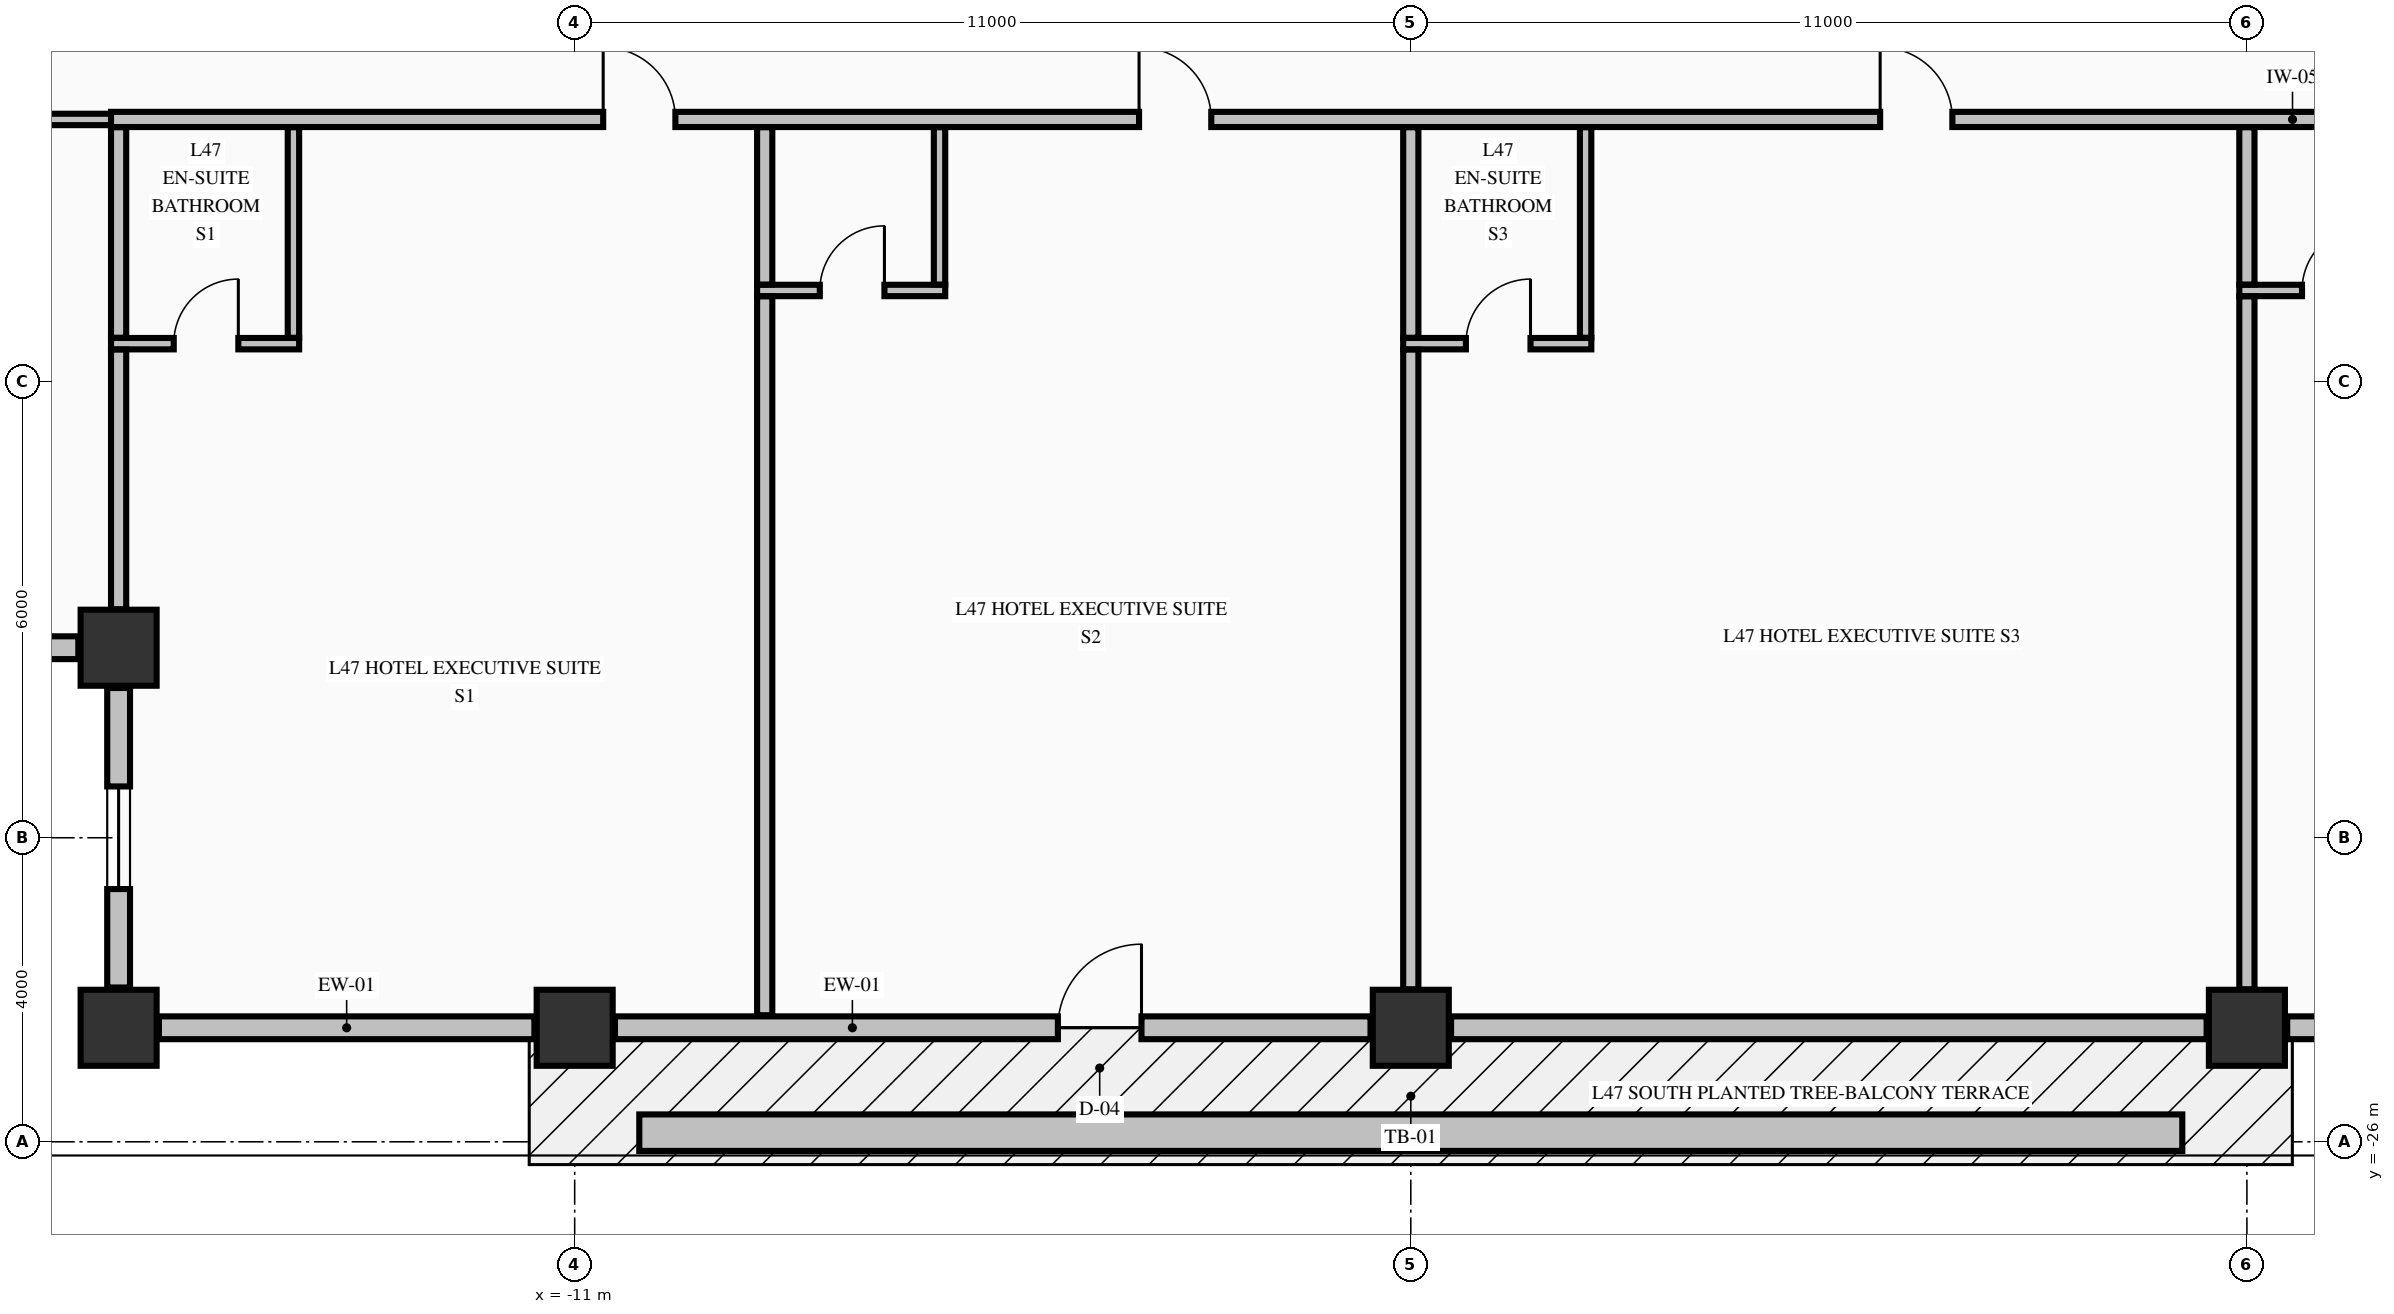
"""IFC4 building model, lengths in metres.
Left out: names, types, materials, properties, quantities, classifications, styles, units other than length and angle.
Written with IfcOpenShell. Run it as: python <this file> out.ifc"""

import sys

from ifc_helpers import new_model, si_unit, direction, frame, frame_2d, origin, origin_2d, place, context, subcontext, project, spatial, rectangle, extrude, element, fill, save


model = new_model("IFC4")
c1 = context("Model", 3, precision=1e-05, world=origin(), true_north=direction((0.0, 1.0)))
c2 = subcontext(c1, "Body", "Model", "MODEL_VIEW")
j1 = project(units=[si_unit("LENGTHUNIT", "METRE"), si_unit("PLANEANGLEUNIT", "RADIAN")], contexts=[c1])
p1 = place(None, origin())
s1 = spatial("IfcSite", under=j1, at=p1, CompositionType="ELEMENT")
p2 = place(p1, origin())
s2 = spatial("IfcBuilding", under=s1, at=p2, CompositionType="ELEMENT")
p3 = place(p2, frame((0.0, 0.0, 183.06)))
s3 = spatial("IfcBuildingStorey", under=s2, at=p3, CompositionType="ELEMENT", Elevation=183.06)
for number, where, z_axis, x_axis in (
    (1, (-17.0, -24.5, -0.25), (0.0, 0.0, 1.0), (1.0, 0.0, 0.0)),
    (2, (-11.0, -24.5, -0.25), (0.0, 0.0, 1.0), (1.0, 0.0, 0.0)),
    (3, (0.0, -24.5, -0.25), (0.0, 0.0, 1.0), (1.0, 0.0, 0.0)),
    (4, (11.0, -24.5, -0.25), (0.0, 0.0, 1.0), (1.0, 0.0, 0.0)),
    (5, (-17.0, -19.5, -0.25), (0.0, 0.0, 1.0), (1.0, 0.0, 0.0)),
):
    element("IfcColumn", number, at=place(p3, frame(where, z_axis=z_axis, x_axis=x_axis)), inside=s3, PredefinedType="COLUMN", context=c2, shape_type="SweptSolid", body=[
        extrude(rectangle(XDim=1.0, YDim=1.0, at=origin_2d()), origin(), (0.0, 0.0, 1.0), 3.225),
    ])
p4 = place(p3, frame((-21.47, -19.5, 0.0), z_axis=(0.0, 0.0, 1.0), x_axis=(1.0, 0.0, 0.0)))
e6 = element("IfcWall", 6, at=p4, inside=s3, PredefinedType="STANDARD", context=c2, shape_type="SweptSolid", body=[
    extrude(rectangle(XDim=3.94, YDim=0.3, at=frame_2d((1.97, 0.0))), origin(), (0.0, 0.0, 1.0), 2.367),
])
p5 = place(p4, frame((1.295, 0.0, 0.68)))
e7 = element("IfcOpeningElement", 7, at=p5, cuts=e6, PredefinedType="OPENING", context=c2, shape_type="SweptSolid", body=[
    extrude(rectangle(XDim=1.35, YDim=1.42, at=frame_2d((0.675, 0.71))), frame((0.0, 0.16, 0.0), z_axis=(0.0, -1.0, 0.0), x_axis=(1.0, 0.0, 0.0)), (0.0, 0.0, 1.0), 0.32),
])
p6 = place(p3, frame((-17.0, -20.03, 0.0), z_axis=(0.0, 0.0, 1.0), x_axis=(0.0, -1.0, 0.0)))
e8 = element("IfcWall", 8, at=p6, inside=s3, PredefinedType="STANDARD", context=c2, shape_type="SweptSolid", body=[
    extrude(rectangle(XDim=3.94, YDim=0.3, at=frame_2d((1.97, 0.0))), origin(), (0.0, 0.0, 1.0), 2.367),
])
p7 = place(p6, frame((1.295, 0.0, 0.68)))
e9 = element("IfcOpeningElement", 9, at=p7, cuts=e8, PredefinedType="OPENING", context=c2, shape_type="SweptSolid", body=[
    extrude(rectangle(XDim=1.35, YDim=1.42, at=frame_2d((0.675, 0.71))), frame((0.0, 0.16, 0.0), z_axis=(0.0, -1.0, 0.0), x_axis=(1.0, 0.0, 0.0)), (0.0, 0.0, 1.0), 0.32),
])
p8 = place(p3, frame((-16.47, -24.5, 0.0), z_axis=(0.0, 0.0, 1.0), x_axis=(1.0, 0.0, 0.0)))
e10 = element("IfcWall", 10, at=p8, inside=s3, PredefinedType="STANDARD", context=c2, shape_type="SweptSolid", body=[
    extrude(rectangle(XDim=4.94, YDim=0.3, at=frame_2d((2.47, 0.0))), origin(), (0.0, 0.0, 1.0), 2.367),
])
p9 = place(p3, frame((-10.47, -24.5, 0.0), z_axis=(0.0, 0.0, 1.0), x_axis=(1.0, 0.0, 0.0)))
e11 = element("IfcWall", 11, at=p9, inside=s3, PredefinedType="STANDARD", context=c2, shape_type="SweptSolid", body=[
    extrude(rectangle(XDim=9.94, YDim=0.3, at=frame_2d((4.97, 0.0))), origin(), (0.0, 0.0, 1.0), 2.367),
])
p10 = place(p9, frame((5.827, 0.0, 0.0)))
e12 = element("IfcOpeningElement", 12, at=p10, cuts=e11, PredefinedType="OPENING", context=c2, shape_type="SweptSolid", body=[
    extrude(rectangle(XDim=1.1, YDim=2.15, at=frame_2d((0.55, 1.075))), frame((0.0, 0.16, 0.0), z_axis=(0.0, -1.0, 0.0), x_axis=(1.0, 0.0, 0.0)), (0.0, 0.0, 1.0), 0.32),
])
for number, where, z_axis, x_axis in (
    (13, (0.53, -24.5, 0.0), (0.0, 0.0, 1.0), (1.0, 0.0, 0.0)),
    (14, (11.53, -24.5, 0.0), (0.0, 0.0, 1.0), (1.0, 0.0, 0.0)),
):
    element("IfcWall", number, at=place(p3, frame(where, z_axis=z_axis, x_axis=x_axis)), inside=s3, PredefinedType="STANDARD", context=c2, shape_type="SweptSolid", body=[
        extrude(rectangle(XDim=9.94, YDim=0.3, at=frame_2d((4.97, 0.0))), origin(), (0.0, 0.0, 1.0), 2.367),
    ])
p11 = place(p3, frame((-17.1, -15.5, 0.0), z_axis=(0.0, 0.0, 1.0), x_axis=(1.0, 0.0, 0.0)))
e15 = element("IfcWall", 15, at=p11, inside=s3, PredefinedType="PARTITIONING", context=c2, shape_type="SweptSolid", body=[
    extrude(rectangle(XDim=2.475, YDim=0.15, at=frame_2d((1.238, 0.0))), origin(), (0.0, 0.0, 1.0), 2.975),
])
p12 = place(p11, frame((0.825, 0.0, 0.0)))
e16 = element("IfcOpeningElement", 16, at=p12, cuts=e15, PredefinedType="OPENING", context=c2, shape_type="SweptSolid", body=[
    extrude(rectangle(XDim=0.85, YDim=2.1, at=frame_2d((0.425, 1.05))), frame((0.0, 0.085, 0.0), z_axis=(0.0, -1.0, 0.0), x_axis=(1.0, 0.0, 0.0)), (0.0, 0.0, 1.0), 0.17),
])
p13 = place(p3, frame((-0.1, -15.5, 0.0), z_axis=(0.0, 0.0, 1.0), x_axis=(1.0, 0.0, 0.0)))
e17 = element("IfcWall", 17, at=p13, inside=s3, PredefinedType="PARTITIONING", context=c2, shape_type="SweptSolid", body=[
    extrude(rectangle(XDim=2.475, YDim=0.15, at=frame_2d((1.238, 0.0))), origin(), (0.0, 0.0, 1.0), 2.975),
])
p14 = place(p13, frame((0.825, 0.0, 0.0)))
e18 = element("IfcOpeningElement", 18, at=p14, cuts=e17, PredefinedType="OPENING", context=c2, shape_type="SweptSolid", body=[
    extrude(rectangle(XDim=0.85, YDim=2.1, at=frame_2d((0.425, 1.05))), frame((0.0, 0.085, 0.0), z_axis=(0.0, -1.0, 0.0), x_axis=(1.0, 0.0, 0.0)), (0.0, 0.0, 1.0), 0.17),
])
p15 = place(p3, frame((-8.6, -14.8, 0.0), z_axis=(0.0, 0.0, 1.0), x_axis=(1.0, 0.0, 0.0)))
e19 = element("IfcWall", 19, at=p15, inside=s3, PredefinedType="PARTITIONING", context=c2, shape_type="SweptSolid", body=[
    extrude(rectangle(XDim=2.475, YDim=0.15, at=frame_2d((1.238, 0.0))), origin(), (0.0, 0.0, 1.0), 2.975),
])
p16 = place(p15, frame((0.825, 0.0, 0.0)))
e20 = element("IfcOpeningElement", 20, at=p16, cuts=e19, PredefinedType="OPENING", context=c2, shape_type="SweptSolid", body=[
    extrude(rectangle(XDim=0.85, YDim=2.1, at=frame_2d((0.425, 1.05))), frame((0.0, 0.085, 0.0), z_axis=(0.0, -1.0, 0.0), x_axis=(1.0, 0.0, 0.0)), (0.0, 0.0, 1.0), 0.17),
])
p17 = place(p3, frame((10.9, -14.8, 0.0), z_axis=(0.0, 0.0, 1.0), x_axis=(1.0, 0.0, 0.0)))
e21 = element("IfcWall", 21, at=p17, inside=s3, PredefinedType="PARTITIONING", context=c2, shape_type="SweptSolid", body=[
    extrude(rectangle(XDim=2.475, YDim=0.15, at=frame_2d((1.238, 0.0))), origin(), (0.0, 0.0, 1.0), 2.975),
])
p18 = place(p17, frame((0.825, 0.0, 0.0)))
e22 = element("IfcOpeningElement", 22, at=p18, cuts=e21, PredefinedType="OPENING", context=c2, shape_type="SweptSolid", body=[
    extrude(rectangle(XDim=0.85, YDim=2.1, at=frame_2d((0.425, 1.05))), frame((0.0, 0.085, 0.0), z_axis=(0.0, -1.0, 0.0), x_axis=(1.0, 0.0, 0.0)), (0.0, 0.0, 1.0), 0.17),
])
p19 = place(p3, frame((-20.075, -12.55, 0.0), z_axis=(0.0, 0.0, 1.0), x_axis=(1.0, 0.0, 0.0)))
e23 = element("IfcWall", 23, at=p19, inside=s3, PredefinedType="PARTITIONING", context=c2, shape_type="SweptSolid", body=[
    extrude(rectangle(XDim=3.175, YDim=0.15, at=frame_2d((1.587, 0.0))), origin(), (0.0, 0.0, 1.0), 2.975),
])
p20 = place(p3, frame((-17.1, -12.55, 0.0), z_axis=(0.0, 0.0, 1.0), x_axis=(1.0, 0.0, 0.0)))
e24 = element("IfcWall", 24, at=p20, inside=s3, PredefinedType="PARTITIONING", context=c2, shape_type="SweptSolid", body=[
    extrude(rectangle(XDim=39.2, YDim=0.2, at=frame_2d((19.6, 0.0))), origin(), (0.0, 0.0, 1.0), 2.975),
])
p21 = place(p20, frame((6.475, 0.0, 0.0)))
e25 = element("IfcOpeningElement", 25, at=p21, cuts=e24, PredefinedType="OPENING", context=c2, shape_type="SweptSolid", body=[
    extrude(rectangle(XDim=0.95, YDim=2.15, at=frame_2d((0.475, 1.075))), frame((0.0, 0.11, 0.0), z_axis=(0.0, -1.0, 0.0), x_axis=(1.0, 0.0, 0.0)), (0.0, 0.0, 1.0), 0.22),
])
p22 = place(p20, frame((13.525, 0.0, 0.0)))
e26 = element("IfcOpeningElement", 26, at=p22, cuts=e24, PredefinedType="OPENING", context=c2, shape_type="SweptSolid", body=[
    extrude(rectangle(XDim=0.95, YDim=2.15, at=frame_2d((0.475, 1.075))), frame((0.0, 0.11, 0.0), z_axis=(0.0, -1.0, 0.0), x_axis=(1.0, 0.0, 0.0)), (0.0, 0.0, 1.0), 0.22),
])
p23 = place(p20, frame((23.275, 0.0, 0.0)))
e27 = element("IfcOpeningElement", 27, at=p23, cuts=e24, PredefinedType="OPENING", context=c2, shape_type="SweptSolid", body=[
    extrude(rectangle(XDim=0.95, YDim=2.15, at=frame_2d((0.475, 1.075))), frame((0.0, 0.11, 0.0), z_axis=(0.0, -1.0, 0.0), x_axis=(1.0, 0.0, 0.0)), (0.0, 0.0, 1.0), 0.22),
])
p24 = place(p20, frame((33.175, 0.0, 0.0)))
e28 = element("IfcOpeningElement", 28, at=p24, cuts=e24, PredefinedType="OPENING", context=c2, shape_type="SweptSolid", body=[
    extrude(rectangle(XDim=0.95, YDim=2.15, at=frame_2d((0.475, 1.075))), frame((0.0, 0.11, 0.0), z_axis=(0.0, -1.0, 0.0), x_axis=(1.0, 0.0, 0.0)), (0.0, 0.0, 1.0), 0.22),
])
p25 = place(p3, frame((-17.0, -18.994, 0.0), z_axis=(0.0, 0.0, 1.0), x_axis=(0.0, 1.0, 0.0)))
e29 = element("IfcWall", 29, at=p25, inside=s3, PredefinedType="PARTITIONING", context=c2, shape_type="SweptSolid", body=[
    extrude(rectangle(XDim=3.416, YDim=0.2, at=frame_2d((1.708, 0.0))), origin(), (0.0, 0.0, 1.0), 2.975),
])
p26 = place(p3, frame((-17.0, -15.422, 0.0), z_axis=(0.0, 0.0, 1.0), x_axis=(0.0, 1.0, 0.0)))
e30 = element("IfcWall", 30, at=p26, inside=s3, PredefinedType="PARTITIONING", context=c2, shape_type="SweptSolid", body=[
    extrude(rectangle(XDim=2.769, YDim=0.2, at=frame_2d((1.385, 0.0))), origin(), (0.0, 0.0, 1.0), 2.975),
])
p27 = place(p3, frame((-14.7, -15.422, 0.0), z_axis=(0.0, 0.0, 1.0), x_axis=(0.0, 1.0, 0.0)))
e31 = element("IfcWall", 31, at=p27, inside=s3, PredefinedType="PARTITIONING", context=c2, shape_type="SweptSolid", body=[
    extrude(rectangle(XDim=2.769, YDim=0.15, at=frame_2d((1.385, 0.0))), origin(), (0.0, 0.0, 1.0), 2.975),
])
p28 = place(p3, frame((-8.5, -24.335, 0.0), z_axis=(0.0, 0.0, 1.0), x_axis=(0.0, 1.0, 0.0)))
e32 = element("IfcWall", 32, at=p28, inside=s3, PredefinedType="PARTITIONING", context=c2, shape_type="SweptSolid", body=[
    extrude(rectangle(XDim=9.457, YDim=0.2, at=frame_2d((4.729, 0.0))), origin(), (0.0, 0.0, 1.0), 2.975),
])
p29 = place(p3, frame((-8.5, -14.722, 0.0), z_axis=(0.0, 0.0, 1.0), x_axis=(0.0, 1.0, 0.0)))
e33 = element("IfcWall", 33, at=p29, inside=s3, PredefinedType="PARTITIONING", context=c2, shape_type="SweptSolid", body=[
    extrude(rectangle(XDim=2.069, YDim=0.2, at=frame_2d((1.034, 0.0))), origin(), (0.0, 0.0, 1.0), 2.975),
])
p30 = place(p3, frame((-6.2, -14.722, 0.0), z_axis=(0.0, 0.0, 1.0), x_axis=(0.0, 1.0, 0.0)))
e34 = element("IfcWall", 34, at=p30, inside=s3, PredefinedType="PARTITIONING", context=c2, shape_type="SweptSolid", body=[
    extrude(rectangle(XDim=2.069, YDim=0.15, at=frame_2d((1.034, 0.0))), origin(), (0.0, 0.0, 1.0), 2.975),
])
p31 = place(p3, frame((0.0, -23.994, 0.0), z_axis=(0.0, 0.0, 1.0), x_axis=(0.0, 1.0, 0.0)))
e35 = element("IfcWall", 35, at=p31, inside=s3, PredefinedType="PARTITIONING", context=c2, shape_type="SweptSolid", body=[
    extrude(rectangle(XDim=8.416, YDim=0.2, at=frame_2d((4.208, 0.0))), origin(), (0.0, 0.0, 1.0), 2.167),
])
p32 = place(p3, frame((0.0, -15.422, 0.0), z_axis=(0.0, 0.0, 1.0), x_axis=(0.0, 1.0, 0.0)))
e36 = element("IfcWall", 36, at=p32, inside=s3, PredefinedType="PARTITIONING", context=c2, shape_type="SweptSolid", body=[
    extrude(rectangle(XDim=2.769, YDim=0.2, at=frame_2d((1.385, 0.0))), origin(), (0.0, 0.0, 1.0), 2.167),
])
p33 = place(p3, frame((2.3, -15.422, 0.0), z_axis=(0.0, 0.0, 1.0), x_axis=(0.0, 1.0, 0.0)))
e37 = element("IfcWall", 37, at=p33, inside=s3, PredefinedType="PARTITIONING", context=c2, shape_type="SweptSolid", body=[
    extrude(rectangle(XDim=2.769, YDim=0.15, at=frame_2d((1.385, 0.0))), origin(), (0.0, 0.0, 1.0), 2.975),
])
p34 = place(p3, frame((11.0, -23.994, 0.0), z_axis=(0.0, 0.0, 1.0), x_axis=(0.0, 1.0, 0.0)))
e38 = element("IfcWall", 38, at=p34, inside=s3, PredefinedType="PARTITIONING", context=c2, shape_type="SweptSolid", body=[
    extrude(rectangle(XDim=9.116, YDim=0.2, at=frame_2d((4.558, 0.0))), origin(), (0.0, 0.0, 1.0), 2.167),
])
p35 = place(p3, frame((11.0, -14.722, 0.0), z_axis=(0.0, 0.0, 1.0), x_axis=(0.0, 1.0, 0.0)))
e39 = element("IfcWall", 39, at=p35, inside=s3, PredefinedType="PARTITIONING", context=c2, shape_type="SweptSolid", body=[
    extrude(rectangle(XDim=2.069, YDim=0.2, at=frame_2d((1.034, 0.0))), origin(), (0.0, 0.0, 1.0), 2.167),
])
p36 = place(p3, frame((-10.15, -25.88, -0.04), z_axis=(0.0, 0.0, 1.0), x_axis=(1.0, 0.0, 0.0)))
e40 = element("IfcWall", 40, at=p36, inside=s3, PredefinedType="PARAPET", context=c2, shape_type="SweptSolid", body=[
    extrude(rectangle(XDim=20.3, YDim=0.48, at=frame_2d((10.15, 0.0))), origin(), (0.0, 0.0, 1.0), 0.52),
])
p37 = place(p7, origin())
e41 = element("IfcWindow", 41, at=p37, inside=s3, PartitioningType="SINGLE_PANEL", PredefinedType="WINDOW", context=c2, shape_type="SweptSolid", body=[
    extrude(rectangle(XDim=1.35, YDim=1.42, at=frame_2d((0.675, 0.71))), frame((0.0, 0.03, 0.0), z_axis=(0.0, -1.0, 0.0), x_axis=(1.0, 0.0, 0.0)), (0.0, 0.0, 1.0), 0.06),
])
fill(e9, e41)
p38 = place(p10, origin())
e42 = element("IfcDoor", 42, at=p38, inside=s3, OperationType="SINGLE_SWING_RIGHT", PredefinedType="DOOR", context=c2, shape_type="SweptSolid", body=[
    extrude(rectangle(XDim=1.1, YDim=2.15, at=frame_2d((0.55, 1.075))), frame((0.0, 0.025, 0.0), z_axis=(0.0, -1.0, 0.0), x_axis=(1.0, 0.0, 0.0)), (0.0, 0.0, 1.0), 0.05),
])
fill(e12, e42)
p39 = place(p21, origin())
e43 = element("IfcDoor", 43, at=p39, inside=s3, OperationType="SINGLE_SWING_LEFT", PredefinedType="DOOR", context=c2, shape_type="SweptSolid", body=[
    extrude(rectangle(XDim=0.95, YDim=2.15, at=frame_2d((0.475, 1.075))), frame((0.0, 0.025, 0.0), z_axis=(0.0, -1.0, 0.0), x_axis=(1.0, 0.0, 0.0)), (0.0, 0.0, 1.0), 0.05),
])
fill(e25, e43)
p40 = place(p12, origin())
e44 = element("IfcDoor", 44, at=p40, inside=s3, OperationType="SINGLE_SWING_RIGHT", PredefinedType="DOOR", context=c2, shape_type="SweptSolid", body=[
    extrude(rectangle(XDim=0.85, YDim=2.1, at=frame_2d((0.425, 1.05))), frame((0.0, 0.025, 0.0), z_axis=(0.0, -1.0, 0.0), x_axis=(1.0, 0.0, 0.0)), (0.0, 0.0, 1.0), 0.05),
])
fill(e16, e44)
p41 = place(p22, origin())
e45 = element("IfcDoor", 45, at=p41, inside=s3, OperationType="SINGLE_SWING_LEFT", PredefinedType="DOOR", context=c2, shape_type="SweptSolid", body=[
    extrude(rectangle(XDim=0.95, YDim=2.15, at=frame_2d((0.475, 1.075))), frame((0.0, 0.025, 0.0), z_axis=(0.0, -1.0, 0.0), x_axis=(1.0, 0.0, 0.0)), (0.0, 0.0, 1.0), 0.05),
])
fill(e26, e45)
p42 = place(p16, origin())
e46 = element("IfcDoor", 46, at=p42, inside=s3, OperationType="SINGLE_SWING_RIGHT", PredefinedType="DOOR", context=c2, shape_type="SweptSolid", body=[
    extrude(rectangle(XDim=0.85, YDim=2.1, at=frame_2d((0.425, 1.05))), frame((0.0, 0.025, 0.0), z_axis=(0.0, -1.0, 0.0), x_axis=(1.0, 0.0, 0.0)), (0.0, 0.0, 1.0), 0.05),
])
fill(e20, e46)
p43 = place(p23, origin())
e47 = element("IfcDoor", 47, at=p43, inside=s3, OperationType="SINGLE_SWING_LEFT", PredefinedType="DOOR", context=c2, shape_type="SweptSolid", body=[
    extrude(rectangle(XDim=0.95, YDim=2.15, at=frame_2d((0.475, 1.075))), frame((0.0, 0.025, 0.0), z_axis=(0.0, -1.0, 0.0), x_axis=(1.0, 0.0, 0.0)), (0.0, 0.0, 1.0), 0.05),
])
fill(e27, e47)
p44 = place(p14, origin())
e48 = element("IfcDoor", 48, at=p44, inside=s3, OperationType="SINGLE_SWING_RIGHT", PredefinedType="DOOR", context=c2, shape_type="SweptSolid", body=[
    extrude(rectangle(XDim=0.85, YDim=2.1, at=frame_2d((0.425, 1.05))), frame((0.0, 0.025, 0.0), z_axis=(0.0, -1.0, 0.0), x_axis=(1.0, 0.0, 0.0)), (0.0, 0.0, 1.0), 0.05),
])
fill(e18, e48)
p45 = place(p18, origin())
e49 = element("IfcDoor", 49, at=p45, inside=s3, OperationType="SINGLE_SWING_RIGHT", PredefinedType="DOOR", context=c2, shape_type="SweptSolid", body=[
    extrude(rectangle(XDim=0.85, YDim=2.1, at=frame_2d((0.425, 1.05))), frame((0.0, 0.025, 0.0), z_axis=(0.0, -1.0, 0.0), x_axis=(1.0, 0.0, 0.0)), (0.0, 0.0, 1.0), 0.05),
])
fill(e22, e49)
save(model, sys.argv[1])
